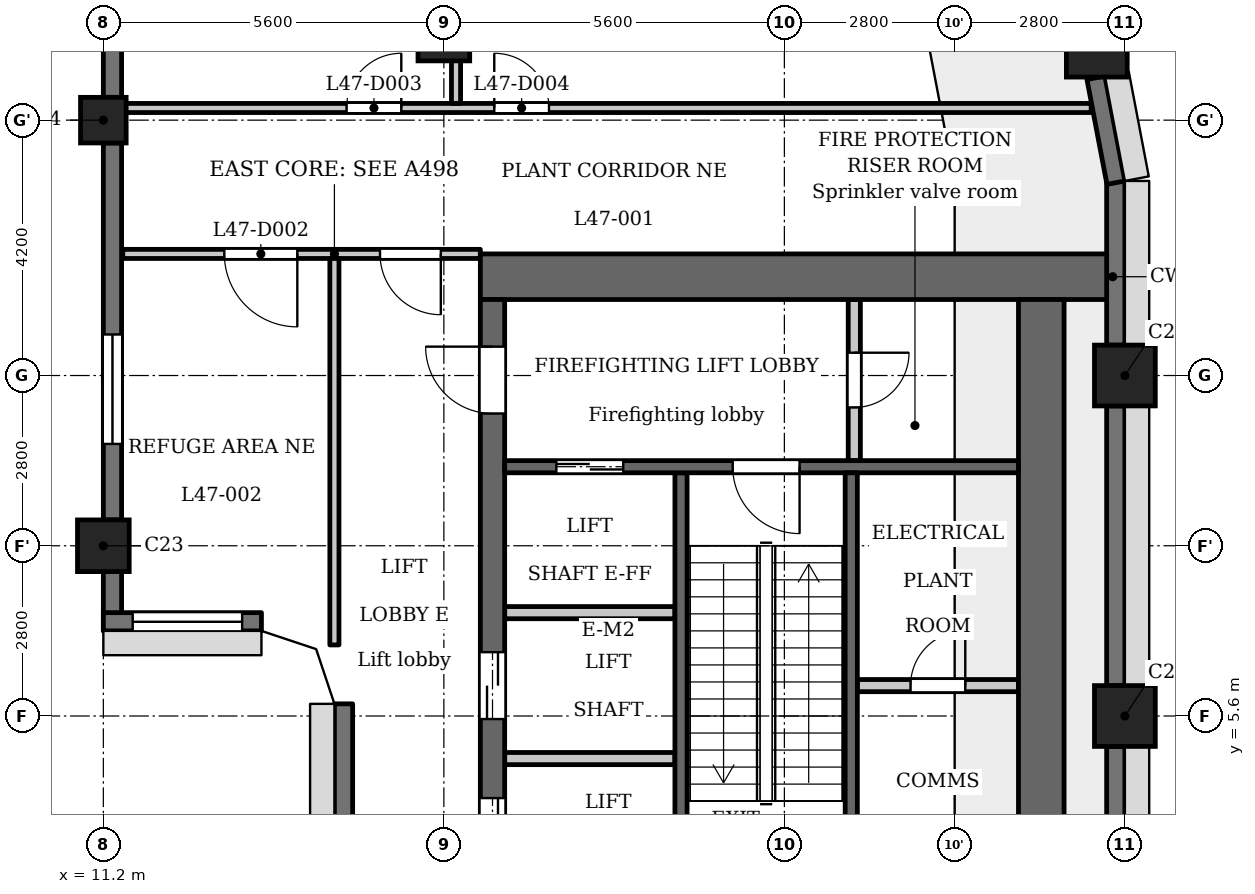
"""IFC4 building model, lengths in metres.
Left out: names, types, materials, properties, quantities, classifications, styles, units other than length and angle.
Written with IfcOpenShell. Run it as: python <this file> out.ifc"""

import sys

from ifc_helpers import new_model, si_unit, direction, frame, frame_2d, origin, origin_2d, place, context, subcontext, project, spatial, polyline, rectangle, outline, extrude, element, fill, save


model = new_model("IFC4")
c1 = context("Model", 3, precision=1e-05, world=origin(), true_north=direction((0.0, 1.0)))
c2 = subcontext(c1, "Body", "Model", "MODEL_VIEW")
j1 = project(units=[si_unit("LENGTHUNIT", "METRE"), si_unit("PLANEANGLEUNIT", "RADIAN")], contexts=[c1])
p1 = place(None, origin())
s1 = spatial("IfcSite", under=j1, at=p1, CompositionType="ELEMENT")
p2 = place(p1, origin())
s2 = spatial("IfcBuilding", under=s1, at=p2, CompositionType="ELEMENT")
p3 = place(p2, frame((0.0, 0.0, 183.5)))
s3 = spatial("IfcBuildingStorey", under=s2, at=p3, CompositionType="ELEMENT", Elevation=183.5)
for number, where, z_axis, x_axis in (
    (1, (28.0, 5.6, 0.0), (0.0, 0.0, 1.0), (1.0, 0.0, 0.0)),
    (2, (28.0, 11.2, 0.0), (0.0, 0.0, 1.0), (1.0, 0.0, 0.0)),
    (3, (27.538, 16.609, 0.0), (0.0, 0.0, 1.0), (1.0, 0.0, 0.0)),
):
    element("IfcColumn", number, at=place(p3, frame(where, z_axis=z_axis, x_axis=x_axis)), inside=s3, PredefinedType="COLUMN", context=c2, shape_type="SweptSolid", body=[
        extrude(rectangle(XDim=1.0, YDim=1.0, at=origin_2d()), origin(), (0.0, 0.0, 1.0), 5.4),
    ])
for number, where, z_axis, x_axis in (
    (4, (16.8, 16.8, 0.0), (0.0, 0.0, 1.0), (1.0, 0.0, 0.0)),
    (5, (11.2, 8.4, 0.0), (0.0, 0.0, 1.0), (1.0, 0.0, 0.0)),
):
    element("IfcColumn", number, at=place(p3, frame(where, z_axis=z_axis, x_axis=x_axis)), inside=s3, PredefinedType="COLUMN", context=c2, shape_type="SweptSolid", body=[
        extrude(rectangle(XDim=0.85, YDim=0.85, at=origin_2d()), origin(), (0.0, 0.0, 1.0), 5.4),
    ])
p4 = place(p3, frame((11.2, 15.4, 0.0), z_axis=(0.0, 0.0, 1.0), x_axis=(1.0, 0.0, 0.0)))
e6 = element("IfcColumn", 6, at=p4, inside=s3, PredefinedType="COLUMN", context=c2, shape_type="SweptSolid", body=[
    extrude(rectangle(XDim=0.75, YDim=0.75, at=origin_2d()), origin(), (0.0, 0.0, 1.0), 5.4),
])
p5 = place(p3, frame((27.85, 0.5, 0.0), z_axis=(0.0, 0.0, 1.0), x_axis=(0.0, 1.0, 0.0)))
e7 = element("IfcWall", 7, at=p5, inside=s3, PredefinedType="SOLIDWALL", context=c2, shape_type="SweptSolid", body=[
    extrude(rectangle(XDim=4.6, YDim=0.3, at=frame_2d((2.3, 0.0))), origin(), (0.0, 0.0, 1.0), 2.6),
])
p6 = place(p3, frame((27.85, 6.1, 0.0), z_axis=(0.0, 0.0, 1.0), x_axis=(0.0, 1.0, 0.0)))
e8 = element("IfcWall", 8, at=p6, inside=s3, PredefinedType="SOLIDWALL", context=c2, shape_type="SweptSolid", body=[
    extrude(rectangle(XDim=4.6, YDim=0.3, at=frame_2d((2.3, 0.0))), origin(), (0.0, 0.0, 1.0), 2.6),
])
p7 = place(p3, frame((27.85, 11.7, 0.0), z_axis=(0.0, 0.0, 1.0), x_axis=(0.0, 1.0, 0.0)))
e9 = element("IfcWall", 9, at=p7, inside=s3, PredefinedType="SOLIDWALL", context=c2, shape_type="SweptSolid", body=[
    extrude(rectangle(XDim=2.7, YDim=0.3, at=frame_2d((1.35, 0.0))), origin(), (0.0, 0.0, 1.0), 2.6),
])
p8 = place(p3, frame((27.853, 14.372, 0.0), z_axis=(0.0, 0.0, 1.0), x_axis=(-0.187259034321, 0.982310569049, 0.0)))
e10 = element("IfcWall", 10, at=p8, inside=s3, PredefinedType="SOLIDWALL", context=c2, shape_type="SweptSolid", body=[
    extrude(rectangle(XDim=1.756, YDim=0.3, at=frame_2d((0.878, 0.0))), origin(), (0.0, 0.0, 1.0), 2.6),
])
p9 = place(p3, frame((11.35, 21.9, 0.0), z_axis=(0.0, 0.0, 1.0), x_axis=(0.0, -1.0, 0.0)))
e11 = element("IfcWall", 11, at=p9, inside=s3, PredefinedType="SOLIDWALL", context=c2, shape_type="SweptSolid", body=[
    extrude(rectangle(XDim=6.125, YDim=0.3, at=frame_2d((3.062, 0.0))), origin(), (0.0, 0.0, 1.0), 4.6),
])
p10 = place(p9, frame((2.163, 0.0, 0.9)))
e12 = element("IfcOpeningElement", 12, at=p10, cuts=e11, PredefinedType="OPENING", context=c2, shape_type="SweptSolid", body=[
    extrude(rectangle(XDim=1.8, YDim=1.5, at=frame_2d((0.9, 0.75))), frame((0.0, 0.16, 0.0), z_axis=(0.0, -1.0, 0.0), x_axis=(1.0, 0.0, 0.0)), (0.0, 0.0, 1.0), 0.32),
])
p11 = place(p3, frame((11.35, 15.025, 0.0), z_axis=(0.0, 0.0, 1.0), x_axis=(0.0, -1.0, 0.0)))
e13 = element("IfcWall", 13, at=p11, inside=s3, PredefinedType="SOLIDWALL", context=c2, shape_type="SweptSolid", body=[
    extrude(rectangle(XDim=6.2, YDim=0.3, at=frame_2d((3.1, 0.0))), origin(), (0.0, 0.0, 1.0), 4.6),
])
p12 = place(p11, frame((3.15, 0.0, 0.9)))
e14 = element("IfcOpeningElement", 14, at=p12, cuts=e13, PredefinedType="OPENING", context=c2, shape_type="SweptSolid", body=[
    extrude(rectangle(XDim=1.8, YDim=1.5, at=frame_2d((0.9, 0.75))), frame((0.0, 0.16, 0.0), z_axis=(0.0, -1.0, 0.0), x_axis=(1.0, 0.0, 0.0)), (0.0, 0.0, 1.0), 0.32),
])
p13 = place(p3, frame((11.35, 7.975, 0.0), z_axis=(0.0, 0.0, 1.0), x_axis=(0.0, -1.0, 0.0)))
e15 = element("IfcWall", 15, at=p13, inside=s3, PredefinedType="SOLIDWALL", context=c2, shape_type="SweptSolid", body=[
    extrude(rectangle(XDim=0.975, YDim=0.3, at=frame_2d((0.488, 0.0))), origin(), (0.0, 0.0, 1.0), 4.6),
])
p14 = place(p3, frame((11.2, 7.15, 0.0), z_axis=(0.0, 0.0, 1.0), x_axis=(1.0, 0.0, 0.0)))
e16 = element("IfcWall", 16, at=p14, inside=s3, PredefinedType="SOLIDWALL", context=c2, shape_type="SweptSolid", body=[
    extrude(rectangle(XDim=2.6, YDim=0.3, at=frame_2d((1.3, 0.0))), origin(), (0.0, 0.0, 1.0), 4.6),
])
p15 = place(p14, frame((0.482, 0.0, 0.9)))
e17 = element("IfcOpeningElement", 17, at=p15, cuts=e16, PredefinedType="OPENING", context=c2, shape_type="SweptSolid", body=[
    extrude(rectangle(XDim=1.8, YDim=1.5, at=frame_2d((0.9, 0.75))), frame((0.0, 0.16, 0.0), z_axis=(0.0, -1.0, 0.0), x_axis=(1.0, 0.0, 0.0)), (0.0, 0.0, 1.0), 0.32),
])
p16 = place(p3, frame((15.15, 5.8, 0.0), z_axis=(0.0, 0.0, 1.0), x_axis=(0.0, -1.0, 0.0)))
e18 = element("IfcWall", 18, at=p16, inside=s3, PredefinedType="SOLIDWALL", context=c2, shape_type="SweptSolid", body=[
    extrude(rectangle(XDim=11.6, YDim=0.3, at=frame_2d((5.8, 0.0))), origin(), (0.0, 0.0, 1.0), 4.6),
])
p17 = place(p3, frame((20.7, 2.6, 0.0), z_axis=(0.0, 0.0, 1.0), x_axis=(0.0, 1.0, 0.0)))
e19 = element("IfcWall", 19, at=p17, inside=s3, PredefinedType="SHEAR", context=c2, shape_type="SweptSolid", body=[
    extrude(rectangle(XDim=7.0, YDim=0.2, at=frame_2d((3.5, 0.0))), origin(), (0.0, 0.0, 1.0), 4.6),
])
p18 = place(p3, frame((17.4, 12.825, 0.0), z_axis=(0.0, 0.0, 1.0), x_axis=(1.0, 0.0, 0.0)))
e20 = element("IfcWall", 20, at=p18, inside=s3, PredefinedType="SHEAR", context=c2, shape_type="SweptSolid", body=[
    extrude(rectangle(XDim=10.4, YDim=0.75, at=frame_2d((5.2, 0.0))), origin(), (0.0, 0.0, 1.0), 4.6),
])
p19 = place(p3, frame((17.6, -12.45, 0.0), z_axis=(0.0, 0.0, 1.0), x_axis=(0.0, 1.0, 0.0)))
e21 = element("IfcWall", 21, at=p19, inside=s3, PredefinedType="SHEAR", context=c2, shape_type="SweptSolid", body=[
    extrude(rectangle(XDim=24.9, YDim=0.4, at=frame_2d((12.45, 0.0))), origin(), (0.0, 0.0, 1.0), 4.6),
])
p20 = place(p19, frame((8.65, 0.0, 0.0)))
e22 = element("IfcOpeningElement", 22, at=p20, cuts=e21, PredefinedType="OPENING", context=c2, shape_type="SweptSolid", body=[
    extrude(rectangle(XDim=0.9, YDim=2.1, at=frame_2d((0.45, 1.05))), frame((0.0, 0.21, 0.0), z_axis=(0.0, -1.0, 0.0), x_axis=(1.0, 0.0, 0.0)), (0.0, 0.0, 1.0), 0.42),
])
p21 = place(p19, frame((15.6, 0.0, 0.0)))
e23 = element("IfcOpeningElement", 23, at=p21, cuts=e21, PredefinedType="OPENING", context=c2, shape_type="SweptSolid", body=[
    extrude(rectangle(XDim=1.1, YDim=2.1, at=frame_2d((0.55, 1.05))), frame((0.0, 0.21, 0.0), z_axis=(0.0, -1.0, 0.0), x_axis=(1.0, 0.0, 0.0)), (0.0, 0.0, 1.0), 0.42),
])
p22 = place(p19, frame((18.0, 0.0, 0.0)))
e24 = element("IfcOpeningElement", 24, at=p22, cuts=e21, PredefinedType="OPENING", context=c2, shape_type="SweptSolid", body=[
    extrude(rectangle(XDim=1.1, YDim=2.1, at=frame_2d((0.55, 1.05))), frame((0.0, 0.21, 0.0), z_axis=(0.0, -1.0, 0.0), x_axis=(1.0, 0.0, 0.0)), (0.0, 0.0, 1.0), 0.42),
])
p23 = place(p19, frame((23.025, 0.0, 0.0)))
e25 = element("IfcOpeningElement", 25, at=p23, cuts=e21, PredefinedType="OPENING", context=c2, shape_type="SweptSolid", body=[
    extrude(rectangle(XDim=1.1, YDim=2.1, at=frame_2d((0.55, 1.05))), frame((0.0, 0.21, 0.0), z_axis=(0.0, -1.0, 0.0), x_axis=(1.0, 0.0, 0.0)), (0.0, 0.0, 1.0), 0.42),
])
p24 = place(p19, frame((0.775, 0.0, 0.0)))
e26 = element("IfcOpeningElement", 26, at=p24, cuts=e21, PredefinedType="OPENING", context=c2, shape_type="SweptSolid", body=[
    extrude(rectangle(XDim=1.1, YDim=2.1, at=frame_2d((0.55, 1.05))), frame((0.0, 0.21, 0.0), z_axis=(0.0, -1.0, 0.0), x_axis=(1.0, 0.0, 0.0)), (0.0, 0.0, 1.0), 0.42),
])
p25 = place(p19, frame((12.925, 0.0, 0.0)))
e27 = element("IfcOpeningElement", 27, at=p25, cuts=e21, PredefinedType="OPENING", context=c2, shape_type="SweptSolid", body=[
    extrude(rectangle(XDim=1.8, YDim=2.1, at=frame_2d((0.9, 1.05))), frame((0.0, 0.21, 0.0), z_axis=(0.0, -1.0, 0.0), x_axis=(1.0, 0.0, 0.0)), (0.0, 0.0, 1.0), 0.42),
])
p26 = place(p3, frame((26.625, -12.45, 0.0), z_axis=(0.0, 0.0, 1.0), x_axis=(0.0, 1.0, 0.0)))
e28 = element("IfcWall", 28, at=p26, inside=s3, PredefinedType="SHEAR", context=c2, shape_type="SweptSolid", body=[
    extrude(rectangle(XDim=24.9, YDim=0.75, at=frame_2d((12.45, 0.0))), origin(), (0.0, 0.0, 1.0), 4.6),
])
p27 = place(p3, frame((23.55, 9.8, 0.0), z_axis=(0.0, 0.0, 1.0), x_axis=(0.0, 1.0, 0.0)))
e29 = element("IfcWall", 29, at=p27, inside=s3, PredefinedType="PARTITIONING", context=c2, shape_type="SweptSolid", body=[
    extrude(rectangle(XDim=2.65, YDim=0.2, at=frame_2d((1.325, 0.0))), origin(), (0.0, 0.0, 1.0), 4.6),
])
p28 = place(p27, frame((0.875, 0.0, 0.0)))
e30 = element("IfcOpeningElement", 30, at=p28, cuts=e29, PredefinedType="OPENING", context=c2, shape_type="SweptSolid", body=[
    extrude(rectangle(XDim=0.9, YDim=2.1, at=frame_2d((0.45, 1.05))), frame((0.0, 0.11, 0.0), z_axis=(0.0, -1.0, 0.0), x_axis=(1.0, 0.0, 0.0)), (0.0, 0.0, 1.0), 0.22),
])
p29 = place(p3, frame((23.6, 6.1, 0.0), z_axis=(0.0, 0.0, 1.0), x_axis=(1.0, 0.0, 0.0)))
e31 = element("IfcWall", 31, at=p29, inside=s3, PredefinedType="PARTITIONING", context=c2, shape_type="SweptSolid", body=[
    extrude(rectangle(XDim=2.65, YDim=0.2, at=frame_2d((1.325, 0.0))), origin(), (0.0, 0.0, 1.0), 4.6),
])
p30 = place(p29, frame((0.875, 0.0, 0.0)))
e32 = element("IfcOpeningElement", 32, at=p30, cuts=e31, PredefinedType="OPENING", context=c2, shape_type="SweptSolid", body=[
    extrude(rectangle(XDim=0.9, YDim=2.1, at=frame_2d((0.45, 1.05))), frame((0.0, 0.11, 0.0), z_axis=(0.0, -1.0, 0.0), x_axis=(1.0, 0.0, 0.0)), (0.0, 0.0, 1.0), 0.22),
])
for number, where, z_axis, x_axis in (
    (33, (17.8, 4.9, 0.0), (0.0, 0.0, 1.0), (1.0, 0.0, 0.0)),
    (34, (17.8, 7.3, 0.0), (0.0, 0.0, 1.0), (1.0, 0.0, 0.0)),
):
    element("IfcWall", number, at=place(p3, frame(where, z_axis=z_axis, x_axis=x_axis)), inside=s3, PredefinedType="PARTITIONING", context=c2, shape_type="SweptSolid", body=[
        extrude(rectangle(XDim=2.8, YDim=0.2, at=frame_2d((1.4, 0.0))), origin(), (0.0, 0.0, 1.0), 4.6),
    ])
p31 = place(p3, frame((17.8, 9.7, 0.0), z_axis=(0.0, 0.0, 1.0), x_axis=(1.0, 0.0, 0.0)))
e35 = element("IfcWall", 35, at=p31, inside=s3, PredefinedType="SHEAR", context=c2, shape_type="SweptSolid", body=[
    extrude(rectangle(XDim=8.45, YDim=0.2, at=frame_2d((4.225, 0.0))), origin(), (0.0, 0.0, 1.0), 4.6),
])
p32 = place(p31, frame((0.85, 0.0, 0.0)))
e36 = element("IfcOpeningElement", 36, at=p32, cuts=e35, PredefinedType="OPENING", context=c2, shape_type="SweptSolid", body=[
    extrude(rectangle(XDim=1.1, YDim=2.1, at=frame_2d((0.55, 1.05))), frame((0.0, 0.11, 0.0), z_axis=(0.0, -1.0, 0.0), x_axis=(1.0, 0.0, 0.0)), (0.0, 0.0, 1.0), 0.22),
])
p33 = place(p31, frame((3.75, 0.0, 0.0)))
e37 = element("IfcOpeningElement", 37, at=p33, cuts=e35, PredefinedType="OPENING", context=c2, shape_type="SweptSolid", body=[
    extrude(rectangle(XDim=1.1, YDim=2.1, at=frame_2d((0.55, 1.05))), frame((0.0, 0.11, 0.0), z_axis=(0.0, -1.0, 0.0), x_axis=(1.0, 0.0, 0.0)), (0.0, 0.0, 1.0), 0.22),
])
p34 = place(p3, frame((23.5, 2.6, 0.0), z_axis=(0.0, 0.0, 1.0), x_axis=(0.0, 1.0, 0.0)))
e38 = element("IfcWall", 38, at=p34, inside=s3, PredefinedType="SHEAR", context=c2, shape_type="SweptSolid", body=[
    extrude(rectangle(XDim=7.0, YDim=0.2, at=frame_2d((3.5, 0.0))), origin(), (0.0, 0.0, 1.0), 4.6),
])
p35 = place(p3, frame((11.52, 13.2, 0.0), z_axis=(0.0, 0.0, 1.0), x_axis=(1.0, 0.0, 0.0)))
e39 = element("IfcWall", 39, at=p35, inside=s3, PredefinedType="PARTITIONING", context=c2, shape_type="SweptSolid", body=[
    extrude(rectangle(XDim=5.88, YDim=0.15, at=frame_2d((2.94, 0.0))), origin(), (0.0, 0.0, 1.0), 4.6),
])
p36 = place(p35, frame((4.23, 0.0, 0.0)))
e40 = element("IfcOpeningElement", 40, at=p36, cuts=e39, PredefinedType="OPENING", context=c2, shape_type="SweptSolid", body=[
    extrude(rectangle(XDim=1.0, YDim=2.1, at=frame_2d((0.5, 1.05))), frame((0.0, 0.085, 0.0), z_axis=(0.0, -1.0, 0.0), x_axis=(1.0, 0.0, 0.0)), (0.0, 0.0, 1.0), 0.17),
])
p37 = place(p35, frame((1.67, 0.0, 0.0)))
e41 = element("IfcOpeningElement", 41, at=p37, cuts=e39, PredefinedType="OPENING", context=c2, shape_type="SweptSolid", body=[
    extrude(rectangle(XDim=1.2, YDim=2.1, at=frame_2d((0.6, 1.05))), frame((0.0, 0.085, 0.0), z_axis=(0.0, -1.0, 0.0), x_axis=(1.0, 0.0, 0.0)), (0.0, 0.0, 1.0), 0.17),
])
p38 = place(p3, frame((11.29, 15.6, 0.0), z_axis=(0.0, 0.0, 1.0), x_axis=(1.0, 0.0, 0.0)))
e42 = element("IfcWall", 42, at=p38, inside=s3, PredefinedType="PARTITIONING", context=c2, shape_type="SweptSolid", body=[
    extrude(rectangle(XDim=16.156, YDim=0.15, at=frame_2d((8.078, 0.0))), origin(), (0.0, 0.0, 1.0), 4.6),
])
p39 = place(p38, frame((3.91, 0.0, 0.0)))
e43 = element("IfcOpeningElement", 43, at=p39, cuts=e42, PredefinedType="OPENING", context=c2, shape_type="SweptSolid", body=[
    extrude(rectangle(XDim=0.9, YDim=2.1, at=frame_2d((0.45, 1.05))), frame((0.0, 0.085, 0.0), z_axis=(0.0, -1.0, 0.0), x_axis=(1.0, 0.0, 0.0)), (0.0, 0.0, 1.0), 0.17),
])
p40 = place(p38, frame((6.339, 0.0, 0.0)))
e44 = element("IfcOpeningElement", 44, at=p40, cuts=e42, PredefinedType="OPENING", context=c2, shape_type="SweptSolid", body=[
    extrude(rectangle(XDim=0.9, YDim=2.1, at=frame_2d((0.45, 1.05))), frame((0.0, 0.085, 0.0), z_axis=(0.0, -1.0, 0.0), x_axis=(1.0, 0.0, 0.0)), (0.0, 0.0, 1.0), 0.17),
])
p41 = place(p3, frame((15.0, 6.769, 0.0), z_axis=(0.0, 0.0, 1.0), x_axis=(0.0, 1.0, 0.0)))
e45 = element("IfcWall", 45, at=p41, inside=s3, PredefinedType="PARTITIONING", context=c2, shape_type="SweptSolid", body=[
    extrude(rectangle(XDim=6.356, YDim=0.15, at=frame_2d((3.178, 0.0))), origin(), (0.0, 0.0, 1.0), 4.6),
])
p42 = place(p3, frame((17.0, 15.675, 0.0), z_axis=(0.0, 0.0, 1.0), x_axis=(0.0, 1.0, 0.0)))
e46 = element("IfcWall", 46, at=p42, inside=s3, PredefinedType="PARTITIONING", context=c2, shape_type="SweptSolid", body=[
    extrude(rectangle(XDim=6.635, YDim=0.15, at=frame_2d((3.317, 0.0))), origin(), (0.0, 0.0, 1.0), 4.6),
])
p43 = place(p3, origin())
e47 = element("IfcWall", 47, at=p43, inside=s3, PredefinedType="SOLIDWALL", context=c2, shape_type="SweptSolid", body=[
    extrude(outline(polyline([(13.8, 7.0), (14.7, 6.7), (15.0, 5.8), (15.3, 5.8), (15.3, 5.849), (14.937, 6.937), (13.849, 7.3), (13.8, 7.3), (13.8, 7.0)])), origin(), (0.0, 0.0, 1.0), 4.6),
])
p44 = place(p21, origin())
e48 = element("IfcDoor", 48, at=p44, inside=s3, OperationType="DOUBLE_DOOR_SLIDING", PredefinedType="DOOR", context=c2, shape_type="SweptSolid", body=[
    extrude(rectangle(XDim=1.1, YDim=2.1, at=frame_2d((0.55, 1.05))), frame((0.0, 0.025, 0.0), z_axis=(0.0, -1.0, 0.0), x_axis=(1.0, 0.0, 0.0)), (0.0, 0.0, 1.0), 0.05),
])
fill(e23, e48)
p45 = place(p22, origin())
e49 = element("IfcDoor", 49, at=p45, inside=s3, OperationType="DOUBLE_DOOR_SLIDING", PredefinedType="DOOR", context=c2, shape_type="SweptSolid", body=[
    extrude(rectangle(XDim=1.1, YDim=2.1, at=frame_2d((0.55, 1.05))), frame((0.0, 0.025, 0.0), z_axis=(0.0, -1.0, 0.0), x_axis=(1.0, 0.0, 0.0)), (0.0, 0.0, 1.0), 0.05),
])
fill(e24, e49)
p46 = place(p32, origin())
e50 = element("IfcDoor", 50, at=p46, inside=s3, OperationType="DOUBLE_DOOR_SLIDING", PredefinedType="DOOR", context=c2, shape_type="SweptSolid", body=[
    extrude(rectangle(XDim=1.1, YDim=2.1, at=frame_2d((0.55, 1.05))), frame((0.0, 0.025, 0.0), z_axis=(0.0, -1.0, 0.0), x_axis=(1.0, 0.0, 0.0)), (0.0, 0.0, 1.0), 0.05),
])
fill(e36, e50)
p47 = place(p23, origin())
e51 = element("IfcDoor", 51, at=p47, inside=s3, OperationType="SINGLE_SWING_LEFT", PredefinedType="DOOR", context=c2, shape_type="SweptSolid", body=[
    extrude(rectangle(XDim=1.1, YDim=2.1, at=frame_2d((0.55, 1.05))), frame((0.0, 0.025, 0.0), z_axis=(0.0, -1.0, 0.0), x_axis=(1.0, 0.0, 0.0)), (0.0, 0.0, 1.0), 0.05),
])
fill(e25, e51)
p48 = place(p28, origin())
e52 = element("IfcDoor", 52, at=p48, inside=s3, OperationType="SINGLE_SWING_RIGHT", PredefinedType="DOOR", context=c2, shape_type="SweptSolid", body=[
    extrude(rectangle(XDim=0.9, YDim=2.1, at=frame_2d((0.45, 1.05))), frame((0.0, 0.025, 0.0), z_axis=(0.0, -1.0, 0.0), x_axis=(1.0, 0.0, 0.0)), (0.0, 0.0, 1.0), 0.05),
])
fill(e30, e52)
p49 = place(p33, origin())
e53 = element("IfcDoor", 53, at=p49, inside=s3, OperationType="SINGLE_SWING_RIGHT", PredefinedType="DOOR", context=c2, shape_type="SweptSolid", body=[
    extrude(rectangle(XDim=1.1, YDim=2.1, at=frame_2d((0.55, 1.05))), frame((0.0, 0.025, 0.0), z_axis=(0.0, -1.0, 0.0), x_axis=(1.0, 0.0, 0.0)), (0.0, 0.0, 1.0), 0.05),
])
fill(e37, e53)
p50 = place(p30, origin())
e54 = element("IfcDoor", 54, at=p50, inside=s3, OperationType="SINGLE_SWING_LEFT", PredefinedType="DOOR", context=c2, shape_type="SweptSolid", body=[
    extrude(rectangle(XDim=0.9, YDim=2.1, at=frame_2d((0.45, 1.05))), frame((0.0, 0.025, 0.0), z_axis=(0.0, -1.0, 0.0), x_axis=(1.0, 0.0, 0.0)), (0.0, 0.0, 1.0), 0.05),
])
fill(e32, e54)
p51 = place(p36, origin())
e55 = element("IfcDoor", 55, at=p51, inside=s3, OperationType="SINGLE_SWING_RIGHT", PredefinedType="DOOR", context=c2, shape_type="SweptSolid", body=[
    extrude(rectangle(XDim=1.0, YDim=2.1, at=frame_2d((0.5, 1.05))), frame((0.0, 0.025, 0.0), z_axis=(0.0, -1.0, 0.0), x_axis=(1.0, 0.0, 0.0)), (0.0, 0.0, 1.0), 0.05),
])
fill(e40, e55)
p52 = place(p37, origin())
e56 = element("IfcDoor", 56, at=p52, inside=s3, OperationType="SINGLE_SWING_RIGHT", PredefinedType="DOOR", context=c2, shape_type="SweptSolid", body=[
    extrude(rectangle(XDim=1.2, YDim=2.1, at=frame_2d((0.6, 1.05))), frame((0.0, 0.025, 0.0), z_axis=(0.0, -1.0, 0.0), x_axis=(1.0, 0.0, 0.0)), (0.0, 0.0, 1.0), 0.05),
])
fill(e41, e56)
p53 = place(p39, origin())
e57 = element("IfcDoor", 57, at=p53, inside=s3, OperationType="SINGLE_SWING_LEFT", PredefinedType="DOOR", context=c2, shape_type="SweptSolid", body=[
    extrude(rectangle(XDim=0.9, YDim=2.1, at=frame_2d((0.45, 1.05))), frame((0.0, 0.025, 0.0), z_axis=(0.0, -1.0, 0.0), x_axis=(1.0, 0.0, 0.0)), (0.0, 0.0, 1.0), 0.05),
])
fill(e43, e57)
p54 = place(p40, origin())
e58 = element("IfcDoor", 58, at=p54, inside=s3, OperationType="SINGLE_SWING_RIGHT", PredefinedType="DOOR", context=c2, shape_type="SweptSolid", body=[
    extrude(rectangle(XDim=0.9, YDim=2.1, at=frame_2d((0.45, 1.05))), frame((0.0, 0.025, 0.0), z_axis=(0.0, -1.0, 0.0), x_axis=(1.0, 0.0, 0.0)), (0.0, 0.0, 1.0), 0.05),
])
fill(e44, e58)
p55 = place(p12, origin())
e59 = element("IfcWindow", 59, at=p55, inside=s3, PartitioningType="SINGLE_PANEL", PredefinedType="WINDOW", context=c2, shape_type="SweptSolid", body=[
    extrude(rectangle(XDim=1.8, YDim=1.5, at=frame_2d((0.9, 0.75))), frame((0.0, 0.03, 0.0), z_axis=(0.0, -1.0, 0.0), x_axis=(1.0, 0.0, 0.0)), (0.0, 0.0, 1.0), 0.06),
])
fill(e14, e59)
p56 = place(p15, origin())
e60 = element("IfcWindow", 60, at=p56, inside=s3, PartitioningType="SINGLE_PANEL", PredefinedType="WINDOW", context=c2, shape_type="SweptSolid", body=[
    extrude(rectangle(XDim=1.8, YDim=1.5, at=frame_2d((0.9, 0.75))), frame((0.0, 0.03, 0.0), z_axis=(0.0, -1.0, 0.0), x_axis=(1.0, 0.0, 0.0)), (0.0, 0.0, 1.0), 0.06),
])
fill(e17, e60)
save(model, sys.argv[1])
